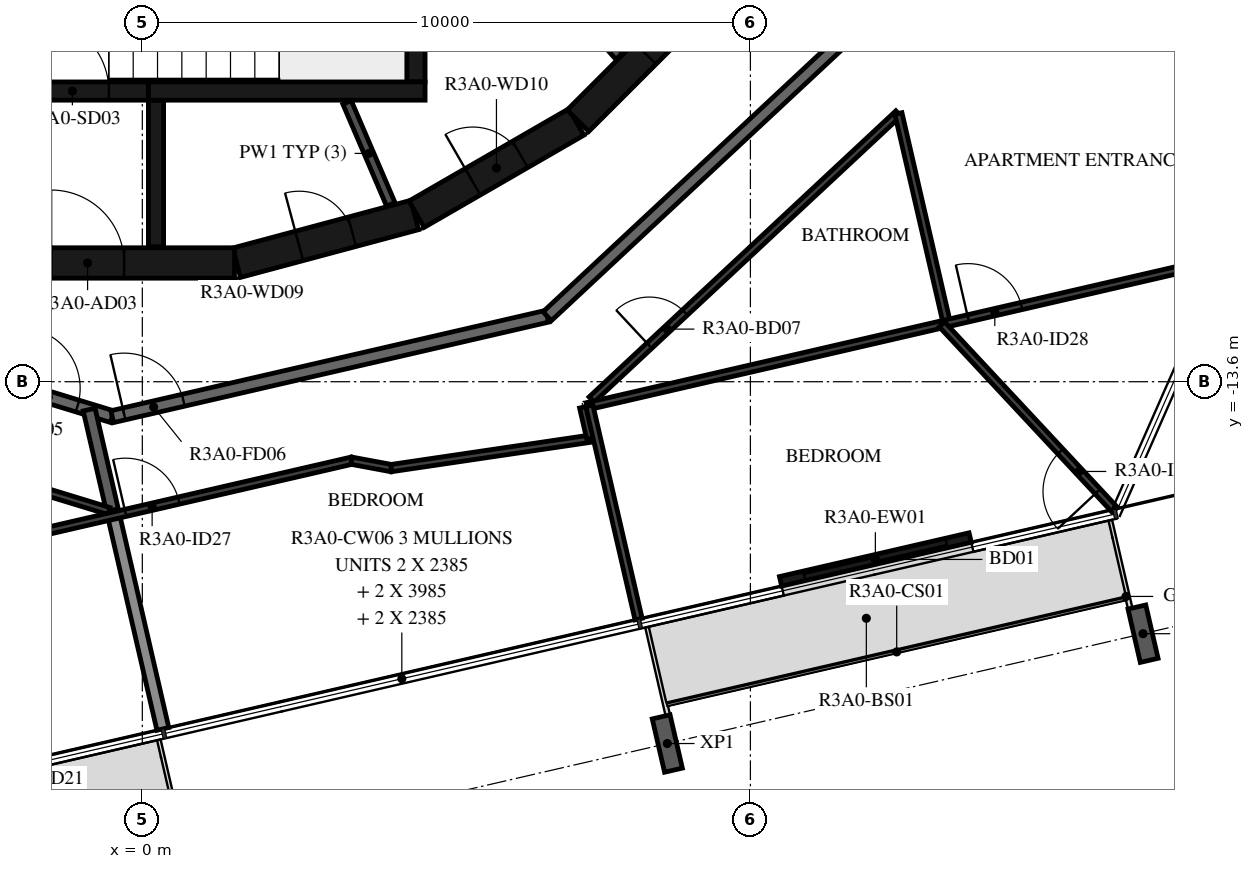
"""IFC4 building model, lengths in metres.
Left out: names, types, materials, properties, quantities, classifications, styles, units other than length and angle.
Written with IfcOpenShell. Run it as: python <this file> out.ifc"""

import sys

from ifc_helpers import new_model, si_unit, direction, frame, frame_2d, origin, origin_2d, place, context, subcontext, project, spatial, rectangle, i_section, extrude, element, fill, save


model = new_model("IFC4")
c1 = context("Model", 3, precision=1e-05, world=origin(), true_north=direction((0.0, 1.0)))
c2 = subcontext(c1, "Body", "Model", "MODEL_VIEW")
j1 = project(units=[si_unit("LENGTHUNIT", "METRE"), si_unit("PLANEANGLEUNIT", "RADIAN")], contexts=[c1])
p1 = place(None, origin())
s1 = spatial("IfcSite", under=j1, at=p1, CompositionType="ELEMENT")
p2 = place(p1, origin())
s2 = spatial("IfcBuilding", under=s1, at=p2, CompositionType="ELEMENT")
p3 = place(p2, frame((0.0, 0.0, 120.4)))
s3 = spatial("IfcBuildingStorey", under=s2, at=p3, CompositionType="ELEMENT", Elevation=120.4)
for number, where, z_axis, x_axis in (
    (1, (8.634, -19.55, -0.38), (0.0, 0.0, 1.0), (-0.974, -0.225, 0.0)),
    (2, (16.457, -17.744, -0.38), (0.0, 0.0, 1.0), (-0.974, -0.225, 0.0)),
):
    element("IfcColumn", number, at=place(p3, frame(where, z_axis=z_axis, x_axis=x_axis)), inside=s3, PredefinedType="COLUMN", context=c2, shape_type="SweptSolid", body=[
        extrude(i_section(OverallWidth=0.3, OverallDepth=0.9, WebThickness=0.019, FlangeThickness=0.035, FilletRadius=0.03, at=origin_2d()), origin(), (0.0, 0.0, 1.0), 3.5),
    ])
p4 = place(p3, frame((10.496, -16.883, 0.0), z_axis=(0.0, 0.0, 1.0), x_axis=(0.974364187477, 0.224976510247, 0.0)))
e3 = element("IfcWall", 3, at=p4, inside=s3, PredefinedType="STANDARD", context=c2, shape_type="SweptSolid", body=[
    extrude(rectangle(XDim=3.2, YDim=0.16, at=frame_2d((1.6, 0.0))), origin(), (0.0, 0.0, 1.0), 3.12),
])
p5 = place(p4, frame((0.4, 0.0, 0.0)))
e4 = element("IfcOpeningElement", 4, at=p5, cuts=e3, PredefinedType="OPENING", context=c2, shape_type="SweptSolid", body=[
    extrude(rectangle(XDim=2.4, YDim=2.4, at=frame_2d((1.2, 1.2))), frame((0.0, 0.09, 0.0), z_axis=(0.0, -1.0, 0.0), x_axis=(1.0, 0.0, 0.0)), (0.0, 0.0, 1.0), 0.18),
])
p6 = place(p3, frame((1.55, -11.643, 0.0), z_axis=(0.0, 0.0, 1.0), x_axis=(0.965948410781, 0.258734743916, 0.0)))
e5 = element("IfcWall", 5, at=p6, inside=s3, PredefinedType="SHEAR", context=c2, shape_type="SweptSolid", body=[
    extrude(rectangle(XDim=3.033, YDim=0.5, at=frame_2d((1.516, 0.0))), origin(), (0.0, 0.0, 1.0), 3.12),
])
p7 = place(p6, frame((1.066, 0.0, 0.0)))
e6 = element("IfcOpeningElement", 6, at=p7, cuts=e5, PredefinedType="OPENING", context=c2, shape_type="SweptSolid", body=[
    extrude(rectangle(XDim=0.9, YDim=2.1, at=frame_2d((0.45, 1.05))), frame((0.0, 0.26, 0.0), z_axis=(0.0, -1.0, 0.0), x_axis=(1.0, 0.0, 0.0)), (0.0, 0.0, 1.0), 0.52),
])
p8 = place(p3, frame((4.51, -10.845, 0.0), z_axis=(0.0, 0.0, 1.0), x_axis=(0.865975092491, 0.500087131594, 0.0)))
e7 = element("IfcWall", 7, at=p8, inside=s3, PredefinedType="SHEAR", context=c2, shape_type="SweptSolid", body=[
    extrude(rectangle(XDim=3.033, YDim=0.5, at=frame_2d((1.516, 0.0))), origin(), (0.0, 0.0, 1.0), 3.12),
])
p9 = place(p8, frame((1.066, 0.0, 0.0)))
e8 = element("IfcOpeningElement", 8, at=p9, cuts=e7, PredefinedType="OPENING", context=c2, shape_type="SweptSolid", body=[
    extrude(rectangle(XDim=0.9, YDim=2.1, at=frame_2d((0.45, 1.05))), frame((0.0, 0.26, 0.0), z_axis=(0.0, -1.0, 0.0), x_axis=(1.0, 0.0, 0.0)), (0.0, 0.0, 1.0), 0.52),
])
p10 = place(p3, frame((7.164, -9.308, 0.0), z_axis=(0.0, 0.0, 1.0), x_axis=(0.707106781187, 0.707106781187, 0.0)))
e9 = element("IfcWall", 9, at=p10, inside=s3, PredefinedType="SHEAR", context=c2, shape_type="SweptSolid", body=[
    extrude(rectangle(XDim=3.032, YDim=0.5, at=frame_2d((1.516, 0.0))), origin(), (0.0, 0.0, 1.0), 3.12),
])
p11 = place(p10, frame((1.566, 0.0, 0.0)))
e10 = element("IfcOpeningElement", 10, at=p11, cuts=e9, PredefinedType="OPENING", context=c2, shape_type="SweptSolid", body=[
    extrude(rectangle(XDim=0.9, YDim=2.1, at=frame_2d((0.45, 1.05))), frame((0.0, 0.26, 0.0), z_axis=(0.0, -1.0, 0.0), x_axis=(1.0, 0.0, 0.0)), (0.0, 0.0, 1.0), 0.52),
])
p12 = place(p3, frame((-1.516, -11.647, 0.0), z_axis=(0.0, 0.0, 1.0), x_axis=(1.0, 0.0, 0.0)))
e11 = element("IfcWall", 11, at=p12, inside=s3, PredefinedType="SHEAR", context=c2, shape_type="SweptSolid", body=[
    extrude(rectangle(XDim=3.033, YDim=0.5, at=frame_2d((1.516, 0.0))), origin(), (0.0, 0.0, 1.0), 3.12),
])
p13 = place(p12, frame((0.016, 0.0, 0.0)))
e12 = element("IfcOpeningElement", 12, at=p13, cuts=e11, PredefinedType="OPENING", context=c2, shape_type="SweptSolid", body=[
    extrude(rectangle(XDim=1.2, YDim=2.1, at=frame_2d((0.6, 1.05))), frame((0.0, 0.26, 0.0), z_axis=(0.0, -1.0, 0.0), x_axis=(1.0, 0.0, 0.0)), (0.0, 0.0, 1.0), 0.52),
])
p14 = place(p3, frame((4.5, -8.67, 0.0), z_axis=(0.0, 0.0, 1.0), x_axis=(0.0, 1.0, 0.0)))
e13 = element("IfcWall", 13, at=p14, inside=s3, PredefinedType="SHEAR", context=c2, shape_type="SweptSolid", body=[
    extrude(rectangle(XDim=3.32, YDim=0.3, at=frame_2d((1.66, 0.0))), origin(), (0.0, 0.0, 1.0), 3.12),
])
p15 = place(p3, frame((0.1, -8.82, 0.0), z_axis=(0.0, 0.0, 1.0), x_axis=(1.0, 0.0, 0.0)))
e14 = element("IfcWall", 14, at=p15, inside=s3, PredefinedType="SHEAR", context=c2, shape_type="SweptSolid", body=[
    extrude(rectangle(XDim=4.55, YDim=0.3, at=frame_2d((2.275, 0.0))), origin(), (0.0, 0.0, 1.0), 3.12),
])
p16 = place(p3, frame((-2.4, -8.82, 0.0), z_axis=(0.0, 0.0, 1.0), x_axis=(1.0, 0.0, 0.0)))
e15 = element("IfcWall", 15, at=p16, inside=s3, PredefinedType="SHEAR", context=c2, shape_type="SweptSolid", body=[
    extrude(rectangle(XDim=2.5, YDim=0.3, at=frame_2d((1.25, 0.0))), origin(), (0.0, 0.0, 1.0), 3.12),
])
p17 = place(p16, frame((0.65, 0.0, 0.0)))
e16 = element("IfcOpeningElement", 16, at=p17, cuts=e15, PredefinedType="OPENING", context=c2, shape_type="SweptSolid", body=[
    extrude(rectangle(XDim=1.2, YDim=2.1, at=frame_2d((0.6, 1.05))), frame((0.0, 0.16, 0.0), z_axis=(0.0, -1.0, 0.0), x_axis=(1.0, 0.0, 0.0)), (0.0, 0.0, 1.0), 0.32),
])
p18 = place(p3, frame((0.225, -8.97, 0.0), z_axis=(0.0, 0.0, 1.0), x_axis=(0.0, -1.0, 0.0)))
e17 = element("IfcWall", 17, at=p18, inside=s3, PredefinedType="SHEAR", context=c2, shape_type="SweptSolid", body=[
    extrude(rectangle(XDim=2.41, YDim=0.25, at=frame_2d((1.205, 0.0))), origin(), (0.0, 0.0, 1.0), 3.12),
])
p19 = place(p3, frame((7.842, -8.248, 0.0), z_axis=(0.0, 0.0, 1.0), x_axis=(-0.66446128181, 0.747322691329, 0.0)))
e18 = element("IfcWall", 18, at=p19, inside=s3, PredefinedType="PARTITIONING", context=c2, shape_type="SweptSolid", body=[
    extrude(rectangle(XDim=4.198, YDim=0.15, at=frame_2d((2.099, 0.0))), origin(), (0.0, 0.0, 1.0), 3.12),
])
p20 = place(p3, frame((3.367, -9.007, 0.0), z_axis=(0.0, 0.0, 1.0), x_axis=(0.394387482265, -0.918944238696, 0.0)))
e19 = element("IfcWall", 19, at=p20, inside=s3, PredefinedType="PARTITIONING", context=c2, shape_type="SweptSolid", body=[
    extrude(rectangle(XDim=1.825, YDim=0.15, at=frame_2d((0.913, 0.0))), origin(), (0.0, 0.0, 1.0), 3.12),
])
p21 = place(p3, frame((-7.516, -12.028, 0.0), z_axis=(0.0, 0.0, 1.0), x_axis=(0.956306642771, -0.292365533182, 0.0)))
e20 = element("IfcWall", 20, at=p21, inside=s3, PredefinedType="STANDARD", context=c2, shape_type="SweptSolid", body=[
    extrude(rectangle(XDim=7.342, YDim=0.2, at=frame_2d((3.671, 0.0))), origin(), (0.0, 0.0, 1.0), 3.12),
])
p22 = place(p21, frame((5.745, 0.0, 0.0)))
e21 = element("IfcOpeningElement", 21, at=p22, cuts=e20, PredefinedType="OPENING", context=c2, shape_type="SweptSolid", body=[
    extrude(rectangle(XDim=1.0, YDim=2.1, at=frame_2d((0.5, 1.05))), frame((0.0, 0.11, 0.0), z_axis=(0.0, -1.0, 0.0), x_axis=(1.0, 0.0, 0.0)), (0.0, 0.0, 1.0), 0.22),
])
p23 = place(p3, frame((-0.495, -14.175, 0.0), z_axis=(0.0, 0.0, 1.0), x_axis=(0.974376622151, 0.224922649383, 0.0)))
e22 = element("IfcWall", 22, at=p23, inside=s3, PredefinedType="STANDARD", context=c2, shape_type="SweptSolid", body=[
    extrude(rectangle(XDim=7.342, YDim=0.2, at=frame_2d((3.671, 0.0))), origin(), (0.0, 0.0, 1.0), 3.12),
])
p24 = place(p23, frame((0.2, 0.0, 0.0)))
e23 = element("IfcOpeningElement", 23, at=p24, cuts=e22, PredefinedType="OPENING", context=c2, shape_type="SweptSolid", body=[
    extrude(rectangle(XDim=1.0, YDim=2.1, at=frame_2d((0.5, 1.05))), frame((0.0, 0.11, 0.0), z_axis=(0.0, -1.0, 0.0), x_axis=(1.0, 0.0, 0.0)), (0.0, 0.0, 1.0), 0.22),
])
p25 = place(p3, frame((6.659, -12.523, 0.0), z_axis=(0.0, 0.0, 1.0), x_axis=(0.731350455479, 0.682001841105, 0.0)))
e24 = element("IfcWall", 24, at=p25, inside=s3, PredefinedType="STANDARD", context=c2, shape_type="SweptSolid", body=[
    extrude(rectangle(XDim=7.342, YDim=0.2, at=frame_2d((3.671, 0.0))), origin(), (0.0, 0.0, 1.0), 3.12),
])
p26 = place(p3, frame((-0.492, -15.713, 0.0), z_axis=(0.0, 0.0, 1.0), x_axis=(-0.224974992875, 0.97436453783, 0.0)))
e25 = element("IfcWall", 25, at=p26, inside=s3, PredefinedType="STANDARD", context=c2, shape_type="SweptSolid", body=[
    extrude(rectangle(XDim=1.698, YDim=0.2, at=frame_2d((0.849, 0.0))), origin(), (0.0, 0.0, 1.0), 3.12),
])
p27 = place(p3, frame((0.338, -19.31, 0.0), z_axis=(0.0, 0.0, 1.0), x_axis=(-0.224943703639, 0.9743717618, 0.0)))
e26 = element("IfcWall", 26, at=p27, inside=s3, PredefinedType="STANDARD", context=c2, shape_type="SweptSolid", body=[
    extrude(rectangle(XDim=3.6, YDim=0.2, at=frame_2d((1.8, 0.0))), origin(), (0.0, 0.0, 1.0), 2.73),
])
p28 = place(p3, frame((-8.339, -13.345, 0.0), z_axis=(0.0, 0.0, 1.0), x_axis=(0.956310145342, -0.292354076276, 0.0)))
e27 = element("IfcWall", 27, at=p28, inside=s3, PredefinedType="PARTITIONING", context=c2, shape_type="SweptSolid", body=[
    extrude(rectangle(XDim=8.146, YDim=0.12, at=frame_2d((4.073, 0.0))), origin(), (0.0, 0.0, 1.0), 3.12),
])
p29 = place(p28, frame((1.565, 0.0, 0.0)))
e28 = element("IfcOpeningElement", 28, at=p29, cuts=e27, PredefinedType="OPENING", context=c2, shape_type="SweptSolid", body=[
    extrude(rectangle(XDim=0.8, YDim=2.1, at=frame_2d((0.4, 1.05))), frame((0.0, 0.07, 0.0), z_axis=(0.0, -1.0, 0.0), x_axis=(1.0, 0.0, 0.0)), (0.0, 0.0, 1.0), 0.14),
])
p30 = place(p3, frame((-14.736, -19.095, 0.0), z_axis=(0.0, 0.0, 1.0), x_axis=(0.974369132722, 0.224955091516, 0.0)))
e29 = element("IfcWall", 29, at=p30, inside=s3, PredefinedType="PARTITIONING", context=c2, shape_type="SweptSolid", body=[
    extrude(rectangle(XDim=18.654, YDim=0.12, at=frame_2d((9.327, 0.0))), origin(), (0.0, 0.0, 1.0), 3.12),
])
p31 = place(p30, frame((3.383, 0.0, 0.0)))
e30 = element("IfcOpeningElement", 30, at=p31, cuts=e29, PredefinedType="OPENING", context=c2, shape_type="SweptSolid", body=[
    extrude(rectangle(XDim=0.9, YDim=2.1, at=frame_2d((0.45, 1.05))), frame((0.0, 0.07, 0.0), z_axis=(0.0, -1.0, 0.0), x_axis=(1.0, 0.0, 0.0)), (0.0, 0.0, 1.0), 0.14),
])
p32 = place(p30, frame((6.81, 0.0, 0.0)))
e31 = element("IfcOpeningElement", 31, at=p32, cuts=e29, PredefinedType="OPENING", context=c2, shape_type="SweptSolid", body=[
    extrude(rectangle(XDim=0.9, YDim=2.1, at=frame_2d((0.45, 1.05))), frame((0.0, 0.07, 0.0), z_axis=(0.0, -1.0, 0.0), x_axis=(1.0, 0.0, 0.0)), (0.0, 0.0, 1.0), 0.14),
])
p33 = place(p30, frame((0.2, 0.0, 0.0)))
e32 = element("IfcOpeningElement", 32, at=p33, cuts=e29, PredefinedType="OPENING", context=c2, shape_type="SweptSolid", body=[
    extrude(rectangle(XDim=0.9, YDim=2.1, at=frame_2d((0.45, 1.05))), frame((0.0, 0.07, 0.0), z_axis=(0.0, -1.0, 0.0), x_axis=(1.0, 0.0, 0.0)), (0.0, 0.0, 1.0), 0.14),
])
p34 = place(p30, frame((14.839, 0.0, 0.0)))
e33 = element("IfcOpeningElement", 33, at=p34, cuts=e29, PredefinedType="OPENING", context=c2, shape_type="SweptSolid", body=[
    extrude(rectangle(XDim=0.9, YDim=2.1, at=frame_2d((0.45, 1.05))), frame((0.0, 0.07, 0.0), z_axis=(0.0, -1.0, 0.0), x_axis=(1.0, 0.0, 0.0)), (0.0, 0.0, 1.0), 0.14),
])
p35 = place(p3, frame((3.44, -14.899, 0.0), z_axis=(0.0, 0.0, 1.0), x_axis=(0.98314539863, -0.182825395264, 0.0)))
e34 = element("IfcWall", 34, at=p35, inside=s3, PredefinedType="PARTITIONING", context=c2, shape_type="SweptSolid", body=[
    extrude(rectangle(XDim=0.665, YDim=0.12, at=frame_2d((0.333, 0.0))), origin(), (0.0, 0.0, 1.0), 3.12),
])
p36 = place(p3, frame((4.094, -15.021, 0.0), z_axis=(0.0, 0.0, 1.0), x_axis=(0.989259616433, 0.146169118814, 0.0)))
e35 = element("IfcWall", 35, at=p36, inside=s3, PredefinedType="PARTITIONING", context=c2, shape_type="SweptSolid", body=[
    extrude(rectangle(XDim=3.311, YDim=0.12, at=frame_2d((1.655, 0.0))), origin(), (0.0, 0.0, 1.0), 3.12),
])
p37 = place(p3, frame((7.368, -14.537, 0.0), z_axis=(0.0, 0.0, 1.0), x_axis=(-0.224960301109, 0.974367929955, 0.0)))
e36 = element("IfcWall", 36, at=p37, inside=s3, PredefinedType="PARTITIONING", context=c2, shape_type="SweptSolid", body=[
    extrude(rectangle(XDim=0.531, YDim=0.12, at=frame_2d((0.265, 0.0))), origin(), (0.0, 0.0, 1.0), 3.12),
])
p38 = place(p3, frame((7.388, -13.894, 0.0), z_axis=(0.0, 0.0, 1.0), x_axis=(0.731339966659, 0.682013088707, 0.0)))
e37 = element("IfcWall", 37, at=p38, inside=s3, PredefinedType="PARTITIONING", context=c2, shape_type="SweptSolid", body=[
    extrude(rectangle(XDim=6.899, YDim=0.12, at=frame_2d((3.45, 0.0))), origin(), (0.0, 0.0, 1.0), 3.12),
])
p39 = place(p38, frame((1.3, 0.0, 0.0)))
e38 = element("IfcOpeningElement", 38, at=p39, cuts=e37, PredefinedType="OPENING", context=c2, shape_type="SweptSolid", body=[
    extrude(rectangle(XDim=0.8, YDim=2.1, at=frame_2d((0.4, 1.05))), frame((0.0, 0.07, 0.0), z_axis=(0.0, -1.0, 0.0), x_axis=(1.0, 0.0, 0.0)), (0.0, 0.0, 1.0), 0.14),
])
p40 = place(p3, frame((12.434, -9.189, 0.0), z_axis=(0.0, 0.0, 1.0), x_axis=(0.224924972887, -0.974376085796, 0.0)))
e39 = element("IfcWall", 39, at=p40, inside=s3, PredefinedType="PARTITIONING", context=c2, shape_type="SweptSolid", body=[
    extrude(rectangle(XDim=3.541, YDim=0.12, at=frame_2d((1.771, 0.0))), origin(), (0.0, 0.0, 1.0), 3.12),
])
p41 = place(p3, frame((7.312, -14.005, 0.0), z_axis=(0.0, 0.0, 1.0), x_axis=(0.974367924791, 0.224960323474, 0.0)))
e40 = element("IfcWall", 40, at=p41, inside=s3, PredefinedType="PARTITIONING", context=c2, shape_type="SweptSolid", body=[
    extrude(rectangle(XDim=14.679, YDim=0.12, at=frame_2d((7.34, 0.0))), origin(), (0.0, 0.0, 1.0), 3.12),
])
p42 = place(p41, frame((6.433, 0.0, 0.0)))
e41 = element("IfcOpeningElement", 41, at=p42, cuts=e40, PredefinedType="OPENING", context=c2, shape_type="SweptSolid", body=[
    extrude(rectangle(XDim=0.9, YDim=2.1, at=frame_2d((0.45, 1.05))), frame((0.0, 0.07, 0.0), z_axis=(0.0, -1.0, 0.0), x_axis=(1.0, 0.0, 0.0)), (0.0, 0.0, 1.0), 0.14),
])
p43 = place(p41, frame((12.812, 0.0, 0.0)))
e42 = element("IfcOpeningElement", 42, at=p43, cuts=e40, PredefinedType="OPENING", context=c2, shape_type="SweptSolid", body=[
    extrude(rectangle(XDim=0.9, YDim=2.1, at=frame_2d((0.45, 1.05))), frame((0.0, 0.07, 0.0), z_axis=(0.0, -1.0, 0.0), x_axis=(1.0, 0.0, 0.0)), (0.0, 0.0, 1.0), 0.14),
])
p44 = place(p3, frame((8.161, -17.504, 0.0), z_axis=(0.0, 0.0, 1.0), x_axis=(-0.224943703639, 0.9743717618, 0.0)))
e43 = element("IfcWall", 43, at=p44, inside=s3, PredefinedType="PARTITIONING", context=c2, shape_type="SweptSolid", body=[
    extrude(rectangle(XDim=3.6, YDim=0.12, at=frame_2d((1.8, 0.0))), origin(), (0.0, 0.0, 1.0), 2.73),
])
p45 = place(p3, frame((15.985, -15.698, 0.0), z_axis=(0.0, 0.0, 1.0), x_axis=(-0.681979185924, 0.731371581322, 0.0)))
e44 = element("IfcWall", 44, at=p45, inside=s3, PredefinedType="PARTITIONING", context=c2, shape_type="SweptSolid", body=[
    extrude(rectangle(XDim=4.157, YDim=0.12, at=frame_2d((2.079, 0.0))), origin(), (0.0, 0.0, 1.0), 3.12),
])
p46 = place(p45, frame((0.4, 0.0, 0.0)))
e45 = element("IfcOpeningElement", 45, at=p46, cuts=e44, PredefinedType="OPENING", context=c2, shape_type="SweptSolid", body=[
    extrude(rectangle(XDim=0.9, YDim=2.1, at=frame_2d((0.45, 1.05))), frame((0.0, 0.07, 0.0), z_axis=(0.0, -1.0, 0.0), x_axis=(1.0, 0.0, 0.0)), (0.0, 0.0, 1.0), 0.14),
])
p47 = place(p5, origin())
e46 = element("IfcDoor", 46, at=p47, inside=s3, OperationType="DOUBLE_DOOR_SLIDING", PredefinedType="DOOR", context=c2, shape_type="SweptSolid", body=[
    extrude(rectangle(XDim=2.4, YDim=2.4, at=frame_2d((1.2, 1.2))), frame((0.0, 0.025, 0.0), z_axis=(0.0, -1.0, 0.0), x_axis=(1.0, 0.0, 0.0)), (0.0, 0.0, 1.0), 0.05),
])
fill(e4, e46)
p48 = place(p17, origin())
e47 = element("IfcDoor", 47, at=p48, inside=s3, OperationType="SINGLE_SWING_LEFT", PredefinedType="DOOR", context=c2, shape_type="SweptSolid", body=[
    extrude(rectangle(XDim=1.2, YDim=2.1, at=frame_2d((0.6, 1.05))), frame((0.0, 0.025, 0.0), z_axis=(0.0, -1.0, 0.0), x_axis=(1.0, 0.0, 0.0)), (0.0, 0.0, 1.0), 0.05),
])
fill(e16, e47)
p49 = place(p13, origin())
e48 = element("IfcDoor", 48, at=p49, inside=s3, OperationType="SINGLE_SWING_RIGHT", PredefinedType="DOOR", context=c2, shape_type="SweptSolid", body=[
    extrude(rectangle(XDim=1.2, YDim=2.1, at=frame_2d((0.6, 1.05))), frame((0.0, 0.025, 0.0), z_axis=(0.0, -1.0, 0.0), x_axis=(1.0, 0.0, 0.0)), (0.0, 0.0, 1.0), 0.05),
])
fill(e12, e48)
p50 = place(p11, origin())
e49 = element("IfcDoor", 49, at=p50, inside=s3, OperationType="SINGLE_SWING_LEFT", PredefinedType="DOOR", context=c2, shape_type="SweptSolid", body=[
    extrude(rectangle(XDim=0.9, YDim=2.1, at=frame_2d((0.45, 1.05))), frame((0.0, 0.025, 0.0), z_axis=(0.0, -1.0, 0.0), x_axis=(1.0, 0.0, 0.0)), (0.0, 0.0, 1.0), 0.05),
])
fill(e10, e49)
p51 = place(p7, origin())
e50 = element("IfcDoor", 50, at=p51, inside=s3, OperationType="SINGLE_SWING_RIGHT", PredefinedType="DOOR", context=c2, shape_type="SweptSolid", body=[
    extrude(rectangle(XDim=0.9, YDim=2.1, at=frame_2d((0.45, 1.05))), frame((0.0, 0.025, 0.0), z_axis=(0.0, -1.0, 0.0), x_axis=(1.0, 0.0, 0.0)), (0.0, 0.0, 1.0), 0.05),
])
fill(e6, e50)
p52 = place(p9, origin())
e51 = element("IfcDoor", 51, at=p52, inside=s3, OperationType="SINGLE_SWING_LEFT", PredefinedType="DOOR", context=c2, shape_type="SweptSolid", body=[
    extrude(rectangle(XDim=0.9, YDim=2.1, at=frame_2d((0.45, 1.05))), frame((0.0, 0.025, 0.0), z_axis=(0.0, -1.0, 0.0), x_axis=(1.0, 0.0, 0.0)), (0.0, 0.0, 1.0), 0.05),
])
fill(e8, e51)
p53 = place(p22, origin())
e52 = element("IfcDoor", 52, at=p53, inside=s3, OperationType="SINGLE_SWING_LEFT", PredefinedType="DOOR", context=c2, shape_type="SweptSolid", body=[
    extrude(rectangle(XDim=1.0, YDim=2.1, at=frame_2d((0.5, 1.05))), frame((0.0, 0.025, 0.0), z_axis=(0.0, -1.0, 0.0), x_axis=(1.0, 0.0, 0.0)), (0.0, 0.0, 1.0), 0.05),
])
fill(e21, e52)
p54 = place(p24, origin())
e53 = element("IfcDoor", 53, at=p54, inside=s3, OperationType="SINGLE_SWING_LEFT", PredefinedType="DOOR", context=c2, shape_type="SweptSolid", body=[
    extrude(rectangle(XDim=1.0, YDim=2.1, at=frame_2d((0.5, 1.05))), frame((0.0, 0.025, 0.0), z_axis=(0.0, -1.0, 0.0), x_axis=(1.0, 0.0, 0.0)), (0.0, 0.0, 1.0), 0.05),
])
fill(e23, e53)
p55 = place(p34, origin())
e54 = element("IfcDoor", 54, at=p55, inside=s3, OperationType="SINGLE_SWING_LEFT", PredefinedType="DOOR", context=c2, shape_type="SweptSolid", body=[
    extrude(rectangle(XDim=0.9, YDim=2.1, at=frame_2d((0.45, 1.05))), frame((0.0, 0.025, 0.0), z_axis=(0.0, -1.0, 0.0), x_axis=(1.0, 0.0, 0.0)), (0.0, 0.0, 1.0), 0.05),
])
fill(e33, e54)
p56 = place(p39, origin())
e55 = element("IfcDoor", 55, at=p56, inside=s3, OperationType="SINGLE_SWING_RIGHT", PredefinedType="DOOR", context=c2, shape_type="SweptSolid", body=[
    extrude(rectangle(XDim=0.8, YDim=2.1, at=frame_2d((0.4, 1.05))), frame((0.0, 0.025, 0.0), z_axis=(0.0, -1.0, 0.0), x_axis=(1.0, 0.0, 0.0)), (0.0, 0.0, 1.0), 0.05),
])
fill(e38, e55)
p57 = place(p42, origin())
e56 = element("IfcDoor", 56, at=p57, inside=s3, OperationType="SINGLE_SWING_RIGHT", PredefinedType="DOOR", context=c2, shape_type="SweptSolid", body=[
    extrude(rectangle(XDim=0.9, YDim=2.1, at=frame_2d((0.45, 1.05))), frame((0.0, 0.025, 0.0), z_axis=(0.0, -1.0, 0.0), x_axis=(1.0, 0.0, 0.0)), (0.0, 0.0, 1.0), 0.05),
])
fill(e41, e56)
p58 = place(p46, origin())
e57 = element("IfcDoor", 57, at=p58, inside=s3, OperationType="SINGLE_SWING_LEFT", PredefinedType="DOOR", context=c2, shape_type="SweptSolid", body=[
    extrude(rectangle(XDim=0.9, YDim=2.1, at=frame_2d((0.45, 1.05))), frame((0.0, 0.025, 0.0), z_axis=(0.0, -1.0, 0.0), x_axis=(1.0, 0.0, 0.0)), (0.0, 0.0, 1.0), 0.05),
])
fill(e45, e57)
save(model, sys.argv[1])
